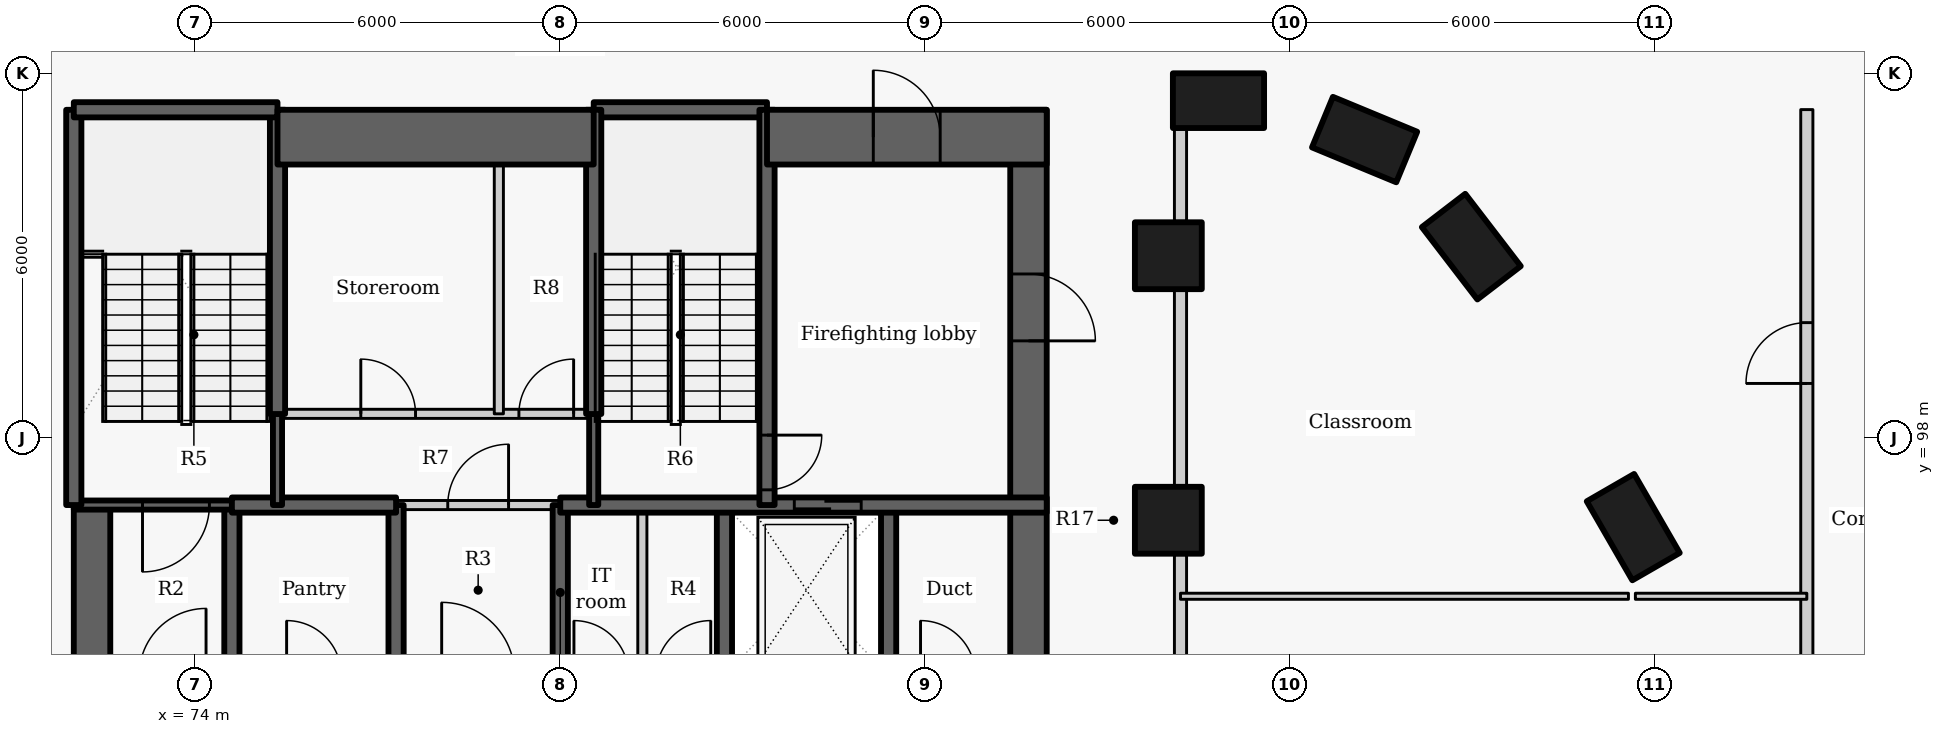
"""IFC4 building model, lengths in metres.
Left out: names, types, materials, properties, quantities, classifications, styles, units other than length and angle.
Written with IfcOpenShell. Run it as: python <this file> out.ifc"""

import sys

from ifc_helpers import new_model, si_unit, direction, frame, frame_2d, origin, origin_2d, place, context, subcontext, project, spatial, rectangle, extrude, element, fill, save


model = new_model("IFC4")
c1 = context("Model", 3, precision=1e-05, world=origin(), true_north=direction((0.0, 1.0)))
c2 = subcontext(c1, "Body", "Model", "MODEL_VIEW")
j1 = project(units=[si_unit("LENGTHUNIT", "METRE"), si_unit("PLANEANGLEUNIT", "RADIAN")], contexts=[c1])
p1 = place(None, origin())
s1 = spatial("IfcSite", under=j1, at=p1, CompositionType="ELEMENT")
p2 = place(p1, origin())
s2 = spatial("IfcBuilding", under=s1, at=p2, CompositionType="ELEMENT")
p3 = place(p2, frame((0.0, 0.0, 19.8)))
s3 = spatial("IfcBuildingStorey", under=s2, at=p3, CompositionType="ELEMENT", Elevation=19.8)
for number, where, z_axis, x_axis in (
    (1, (97.646, 96.537, 0.0), (0.0, 0.0, 1.0), (-0.5, 0.866, 0.0)),
    (2, (94.982, 101.149, 0.0), (0.0, 0.0, 1.0), (-0.609, 0.793, 0.0)),
    (3, (93.227, 102.91, 0.0), (0.0, 0.0, 1.0), (-0.924, 0.383, 0.0)),
    (4, (90.825, 103.55, 0.0), (0.0, 0.0, 1.0), (-1.0, 0.0, 0.0)),
):
    element("IfcColumn", number, at=place(p3, frame(where, z_axis=z_axis, x_axis=x_axis)), inside=s3, PredefinedType="COLUMN", context=c2, shape_type="SweptSolid", body=[
        extrude(rectangle(XDim=1.5, YDim=0.9, at=origin_2d()), origin(), (0.0, 0.0, 1.0), 4.2),
    ])
for number, where, z_axis, x_axis in (
    (5, (90.0, 96.65, 0.0), (0.0, 0.0, 1.0), (0.0, 1.0, 0.0)),
    (6, (90.0, 101.0, 0.0), (0.0, 0.0, 1.0), (0.0, 1.0, 0.0)),
):
    element("IfcColumn", number, at=place(p3, frame(where, z_axis=z_axis, x_axis=x_axis)), inside=s3, PredefinedType="COLUMN", context=c2, shape_type="SweptSolid", body=[
        extrude(rectangle(XDim=1.1, YDim=1.1, at=origin_2d()), origin(), (0.0, 0.0, 1.0), 4.2),
    ])
p4 = place(p3, frame((74.6, 94.1, -0.3), z_axis=(0.0, 0.0, 1.0), x_axis=(0.0, 1.0, 0.0)))
e7 = element("IfcWall", 7, at=p4, inside=s3, PredefinedType="SHEAR", context=c2, shape_type="SweptSolid", body=[
    extrude(rectangle(XDim=2.8, YDim=0.25, at=frame_2d((1.4, 0.0))), origin(), (0.0, 0.0, 1.0), 4.2),
])
p5 = place(p3, frame((72.3, 87.8, -0.3), z_axis=(0.0, 0.0, 1.0), x_axis=(0.0, 1.0, 0.0)))
e8 = element("IfcWall", 8, at=p5, inside=s3, PredefinedType="SHEAR", context=c2, shape_type="SweptSolid", body=[
    extrude(rectangle(XDim=9.1, YDim=0.6, at=frame_2d((4.55, 0.0))), origin(), (0.0, 0.0, 1.0), 4.2),
])
for number, where, z_axis, x_axis in (
    (9, (77.3, 94.1, -0.3), (0.0, 0.0, 1.0), (0.0, 1.0, 0.0)),
    (10, (80.0, 94.1, -0.3), (0.0, 0.0, 1.0), (0.0, 1.0, 0.0)),
    (11, (82.7, 94.1, -0.3), (0.0, 0.0, 1.0), (0.0, 1.0, 0.0)),
    (12, (85.4, 94.1, -0.3), (0.0, 0.0, 1.0), (0.0, 1.0, 0.0)),
):
    element("IfcWall", number, at=place(p3, frame(where, z_axis=z_axis, x_axis=x_axis)), inside=s3, PredefinedType="SHEAR", context=c2, shape_type="SweptSolid", body=[
        extrude(rectangle(XDim=2.8, YDim=0.25, at=frame_2d((1.4, 0.0))), origin(), (0.0, 0.0, 1.0), 4.2),
    ])
p6 = place(p3, frame((87.7, 103.4, -0.3), z_axis=(0.0, 0.0, 1.0), x_axis=(0.0, -1.0, 0.0)))
e13 = element("IfcWall", 13, at=p6, inside=s3, PredefinedType="SHEAR", context=c2, shape_type="SweptSolid", body=[
    extrude(rectangle(XDim=15.6, YDim=0.6, at=frame_2d((7.8, 0.0))), origin(), (0.0, 0.0, 1.0), 4.2),
])
p7 = place(p6, frame((2.7, 0.0, 0.3)))
e14 = element("IfcOpeningElement", 14, at=p7, cuts=e13, PredefinedType="OPENING", context=c2, shape_type="SweptSolid", body=[
    extrude(rectangle(XDim=1.1, YDim=2.1, at=frame_2d((0.55, 1.05))), frame((0.0, 0.31, 0.0), z_axis=(0.0, -1.0, 0.0), x_axis=(1.0, 0.0, 0.0)), (0.0, 0.0, 1.0), 0.62),
])
p8 = place(p3, frame((74.6, 96.9, -0.3), z_axis=(0.0, 0.0, 1.0), x_axis=(-1.0, 0.0, 0.0)))
e15 = element("IfcWall", 15, at=p8, inside=s3, PredefinedType="SHEAR", context=c2, shape_type="SweptSolid", body=[
    extrude(rectangle(XDim=2.6, YDim=0.15, at=frame_2d((1.3, 0.0))), origin(), (0.0, 0.0, 1.0), 4.2),
])
p9 = place(p8, frame((0.37, 0.0, 0.3)))
e16 = element("IfcOpeningElement", 16, at=p9, cuts=e15, PredefinedType="OPENING", context=c2, shape_type="SweptSolid", body=[
    extrude(rectangle(XDim=1.1, YDim=2.1, at=frame_2d((0.55, 1.05))), frame((0.0, 0.085, 0.0), z_axis=(0.0, -1.0, 0.0), x_axis=(1.0, 0.0, 0.0)), (0.0, 0.0, 1.0), 0.17),
])
p10 = place(p3, frame((74.6, 96.9, -0.3), z_axis=(0.0, 0.0, 1.0), x_axis=(1.0, 0.0, 0.0)))
e17 = element("IfcWall", 17, at=p10, inside=s3, PredefinedType="SHEAR", context=c2, shape_type="SweptSolid", body=[
    extrude(rectangle(XDim=2.7, YDim=0.25, at=frame_2d((1.35, 0.0))), origin(), (0.0, 0.0, 1.0), 4.2),
])
p11 = place(p3, frame((80.0, 96.9, -0.3), z_axis=(0.0, 0.0, 1.0), x_axis=(1.0, 0.0, 0.0)))
e18 = element("IfcWall", 18, at=p11, inside=s3, PredefinedType="SHEAR", context=c2, shape_type="SweptSolid", body=[
    extrude(rectangle(XDim=8.0, YDim=0.25, at=frame_2d((4.0, 0.0))), origin(), (0.0, 0.0, 1.0), 4.2),
])
p12 = place(p11, frame((3.849, 0.0, 0.3)))
e19 = element("IfcOpeningElement", 19, at=p12, cuts=e18, PredefinedType="OPENING", context=c2, shape_type="SweptSolid", body=[
    extrude(rectangle(XDim=1.1, YDim=2.1, at=frame_2d((0.55, 1.05))), frame((0.0, 0.135, 0.0), z_axis=(0.0, -1.0, 0.0), x_axis=(1.0, 0.0, 0.0)), (0.0, 0.0, 1.0), 0.27),
])
p13 = place(p3, frame((77.3, 96.9, 0.0), z_axis=(0.0, 0.0, 1.0), x_axis=(1.0, 0.0, 0.0)))
e20 = element("IfcWall", 20, at=p13, inside=s3, PredefinedType="PARTITIONING", context=c2, shape_type="SweptSolid", body=[
    extrude(rectangle(XDim=2.7, YDim=0.15, at=frame_2d((1.35, 0.0))), origin(), (0.0, 0.0, 1.0), 3.9),
])
p14 = place(p13, frame((0.85, 0.0, 0.0)))
e21 = element("IfcOpeningElement", 21, at=p14, cuts=e20, PredefinedType="OPENING", context=c2, shape_type="SweptSolid", body=[
    extrude(rectangle(XDim=1.0, YDim=2.1, at=frame_2d((0.5, 1.05))), frame((0.0, 0.085, 0.0), z_axis=(0.0, -1.0, 0.0), x_axis=(1.0, 0.0, 0.0)), (0.0, 0.0, 1.0), 0.17),
])
p15 = place(p3, frame((81.35, 94.1, 0.0), z_axis=(0.0, 0.0, 1.0), x_axis=(0.0, 1.0, 0.0)))
e22 = element("IfcWall", 22, at=p15, inside=s3, PredefinedType="PARTITIONING", context=c2, shape_type="SweptSolid", body=[
    extrude(rectangle(XDim=2.8, YDim=0.15, at=frame_2d((1.4, 0.0))), origin(), (0.0, 0.0, 1.0), 3.9),
])
p16 = place(p3, frame((75.35, 96.9, -0.3), z_axis=(0.0, 0.0, 1.0), x_axis=(0.0, 1.0, 0.0)))
e23 = element("IfcWall", 23, at=p16, inside=s3, PredefinedType="SHEAR", context=c2, shape_type="SweptSolid", body=[
    extrude(rectangle(XDim=1.503, YDim=0.15, at=frame_2d((0.751, 0.0))), origin(), (0.0, 0.0, 1.0), 4.2),
])
p17 = place(p3, frame((75.35, 98.397, -0.3), z_axis=(0.0, 0.0, 1.0), x_axis=(0.0, 1.0, 0.0)))
e24 = element("IfcWall", 24, at=p17, inside=s3, PredefinedType="SHEAR", context=c2, shape_type="SweptSolid", body=[
    extrude(rectangle(XDim=5.003, YDim=0.25, at=frame_2d((2.501, 0.0))), origin(), (0.0, 0.0, 1.0), 4.2),
])
p18 = place(p3, frame((72.0, 96.9, -0.3), z_axis=(0.0, 0.0, 1.0), x_axis=(0.0, 1.0, 0.0)))
e25 = element("IfcWall", 25, at=p18, inside=s3, PredefinedType="SHEAR", context=c2, shape_type="SweptSolid", body=[
    extrude(rectangle(XDim=6.5, YDim=0.25, at=frame_2d((3.25, 0.0))), origin(), (0.0, 0.0, 1.0), 4.2),
])
p19 = place(p3, frame((72.0, 103.4, -0.3), z_axis=(0.0, 0.0, 1.0), x_axis=(1.0, 0.0, 0.0)))
e26 = element("IfcWall", 26, at=p19, inside=s3, PredefinedType="SHEAR", context=c2, shape_type="SweptSolid", body=[
    extrude(rectangle(XDim=3.35, YDim=0.25, at=frame_2d((1.675, 0.0))), origin(), (0.0, 0.0, 1.0), 4.2),
])
p20 = place(p3, frame((80.55, 103.4, -0.3), z_axis=(0.0, 0.0, 1.0), x_axis=(1.0, 0.0, 0.0)))
e27 = element("IfcWall", 27, at=p20, inside=s3, PredefinedType="SHEAR", context=c2, shape_type="SweptSolid", body=[
    extrude(rectangle(XDim=2.85, YDim=0.25, at=frame_2d((1.425, 0.0))), origin(), (0.0, 0.0, 1.0), 4.2),
])
p21 = place(p3, frame((83.4, 103.4, -0.3), z_axis=(0.0, 0.0, 1.0), x_axis=(0.0, -1.0, 0.0)))
e28 = element("IfcWall", 28, at=p21, inside=s3, PredefinedType="SHEAR", context=c2, shape_type="SweptSolid", body=[
    extrude(rectangle(XDim=6.5, YDim=0.25, at=frame_2d((3.25, 0.0))), origin(), (0.0, 0.0, 1.0), 4.2),
])
p22 = place(p21, frame((5.35, 0.0, 0.3)))
e29 = element("IfcOpeningElement", 29, at=p22, cuts=e28, PredefinedType="OPENING", context=c2, shape_type="SweptSolid", body=[
    extrude(rectangle(XDim=0.9, YDim=2.1, at=frame_2d((0.45, 1.05))), frame((0.0, 0.135, 0.0), z_axis=(0.0, -1.0, 0.0), x_axis=(1.0, 0.0, 0.0)), (0.0, 0.0, 1.0), 0.27),
])
p23 = place(p3, frame((80.55, 96.9, -0.3), z_axis=(0.0, 0.0, 1.0), x_axis=(0.0, 1.0, 0.0)))
e30 = element("IfcWall", 30, at=p23, inside=s3, PredefinedType="SHEAR", context=c2, shape_type="SweptSolid", body=[
    extrude(rectangle(XDim=1.503, YDim=0.15, at=frame_2d((0.751, 0.0))), origin(), (0.0, 0.0, 1.0), 4.2),
])
p24 = place(p3, frame((80.55, 98.397, -0.3), z_axis=(0.0, 0.0, 1.0), x_axis=(0.0, 1.0, 0.0)))
e31 = element("IfcWall", 31, at=p24, inside=s3, PredefinedType="SHEAR", context=c2, shape_type="SweptSolid", body=[
    extrude(rectangle(XDim=5.003, YDim=0.25, at=frame_2d((2.501, 0.0))), origin(), (0.0, 0.0, 1.0), 4.2),
])
p25 = place(p3, frame((75.35, 102.95, -0.3), z_axis=(0.0, 0.0, 1.0), x_axis=(1.0, 0.0, 0.0)))
e32 = element("IfcWall", 32, at=p25, inside=s3, PredefinedType="SHEAR", context=c2, shape_type="SweptSolid", body=[
    extrude(rectangle(XDim=5.2, YDim=0.9, at=frame_2d((2.6, 0.0))), origin(), (0.0, 0.0, 1.0), 4.2),
])
p26 = place(p3, frame((83.4, 102.95, -0.3), z_axis=(0.0, 0.0, 1.0), x_axis=(1.0, 0.0, 0.0)))
e33 = element("IfcWall", 33, at=p26, inside=s3, PredefinedType="SHEAR", context=c2, shape_type="SweptSolid", body=[
    extrude(rectangle(XDim=4.6, YDim=0.9, at=frame_2d((2.3, 0.0))), origin(), (0.0, 0.0, 1.0), 4.2),
])
p27 = place(p26, frame((1.748, 0.0, 0.3)))
e34 = element("IfcOpeningElement", 34, at=p27, cuts=e33, PredefinedType="OPENING", context=c2, shape_type="SweptSolid", body=[
    extrude(rectangle(XDim=1.1, YDim=2.1, at=frame_2d((0.55, 1.05))), frame((0.0, 0.46, 0.0), z_axis=(0.0, -1.0, 0.0), x_axis=(1.0, 0.0, 0.0)), (0.0, 0.0, 1.0), 0.92),
])
p28 = place(p3, frame((75.35, 98.4, 0.0), z_axis=(0.0, 0.0, 1.0), x_axis=(1.0, 0.0, 0.0)))
e35 = element("IfcWall", 35, at=p28, inside=s3, PredefinedType="PARTITIONING", context=c2, shape_type="SweptSolid", body=[
    extrude(rectangle(XDim=5.2, YDim=0.15, at=frame_2d((2.6, 0.0))), origin(), (0.0, 0.0, 1.0), 3.9),
])
p29 = place(p28, frame((1.37, 0.0, 0.0)))
e36 = element("IfcOpeningElement", 36, at=p29, cuts=e35, PredefinedType="OPENING", context=c2, shape_type="SweptSolid", body=[
    extrude(rectangle(XDim=0.9, YDim=2.1, at=frame_2d((0.45, 1.05))), frame((0.0, 0.085, 0.0), z_axis=(0.0, -1.0, 0.0), x_axis=(1.0, 0.0, 0.0)), (0.0, 0.0, 1.0), 0.17),
])
p30 = place(p28, frame((3.97, 0.0, 0.0)))
e37 = element("IfcOpeningElement", 37, at=p30, cuts=e35, PredefinedType="OPENING", context=c2, shape_type="SweptSolid", body=[
    extrude(rectangle(XDim=0.9, YDim=2.1, at=frame_2d((0.45, 1.05))), frame((0.0, 0.085, 0.0), z_axis=(0.0, -1.0, 0.0), x_axis=(1.0, 0.0, 0.0)), (0.0, 0.0, 1.0), 0.17),
])
p31 = place(p3, frame((78.99, 98.4, 0.0), z_axis=(0.0, 0.0, 1.0), x_axis=(0.0, 1.0, 0.0)))
e38 = element("IfcWall", 38, at=p31, inside=s3, PredefinedType="PARTITIONING", context=c2, shape_type="SweptSolid", body=[
    extrude(rectangle(XDim=5.0, YDim=0.15, at=frame_2d((2.5, 0.0))), origin(), (0.0, 0.0, 1.0), 3.9),
])
p32 = place(p3, frame((100.5, 92.53, 0.0), z_axis=(0.0, 0.0, 1.0), x_axis=(0.0, 1.0, 0.0)))
e39 = element("IfcWall", 39, at=p32, inside=s3, PredefinedType="PARTITIONING", context=c2, shape_type="SweptSolid", body=[
    extrude(rectangle(XDim=10.873, YDim=0.2, at=frame_2d((5.437, 0.0))), origin(), (0.0, 0.0, 1.0), 3.9),
])
p33 = place(p32, frame((6.37, 0.0, 0.0)))
e40 = element("IfcOpeningElement", 40, at=p33, cuts=e39, PredefinedType="OPENING", context=c2, shape_type="SweptSolid", body=[
    extrude(rectangle(XDim=1.0, YDim=2.1, at=frame_2d((0.5, 1.05))), frame((0.0, 0.11, 0.0), z_axis=(0.0, -1.0, 0.0), x_axis=(1.0, 0.0, 0.0)), (0.0, 0.0, 1.0), 0.22),
])
for number, where, z_axis, x_axis in (
    (41, (90.2, 92.867, 0.0), (0.0, 0.0, 1.0), (0.0, 1.0, 0.0)),
    (42, (90.2, 97.217, 0.0), (0.0, 0.0, 1.0), (0.0, 1.0, 0.0)),
):
    element("IfcWall", number, at=place(p3, frame(where, z_axis=z_axis, x_axis=x_axis)), inside=s3, PredefinedType="PARTITIONING", context=c2, shape_type="SweptSolid", body=[
        extrude(rectangle(XDim=3.216, YDim=0.2, at=frame_2d((1.608, 0.0))), origin(), (0.0, 0.0, 1.0), 3.13),
    ])
p34 = place(p3, frame((90.2, 101.567, 0.0), z_axis=(0.0, 0.0, 1.0), x_axis=(0.0, 1.0, 0.0)))
e43 = element("IfcWall", 43, at=p34, inside=s3, PredefinedType="PARTITIONING", context=c2, shape_type="SweptSolid", body=[
    extrude(rectangle(XDim=1.516, YDim=0.2, at=frame_2d((0.758, 0.0))), origin(), (0.0, 0.0, 1.0), 3.9),
])
p35 = place(p3, frame((90.2, 95.4, 0.0), z_axis=(0.0, 0.0, 1.0), x_axis=(1.0, 0.0, 0.0)))
e44 = element("IfcWall", 44, at=p35, inside=s3, PredefinedType="PARTITIONING", context=c2, shape_type="SweptSolid", body=[
    extrude(rectangle(XDim=7.366, YDim=0.1, at=frame_2d((3.683, 0.0))), origin(), (0.0, 0.0, 1.0), 3.9),
])
p36 = place(p3, frame((97.68, 95.4, 0.0), z_axis=(0.0, 0.0, 1.0), x_axis=(1.0, 0.0, 0.0)))
e45 = element("IfcWall", 45, at=p36, inside=s3, PredefinedType="PARTITIONING", context=c2, shape_type="SweptSolid", body=[
    extrude(rectangle(XDim=2.82, YDim=0.1, at=frame_2d((1.41, 0.0))), origin(), (0.0, 0.0, 1.0), 2.98),
])
p37 = place(p12, origin())
e46 = element("IfcDoor", 46, at=p37, inside=s3, OperationType="SLIDING_TO_LEFT", PredefinedType="DOOR", context=c2, shape_type="SweptSolid", body=[
    extrude(rectangle(XDim=1.1, YDim=2.1, at=frame_2d((0.55, 1.05))), frame((0.0, 0.025, 0.0), z_axis=(0.0, -1.0, 0.0), x_axis=(1.0, 0.0, 0.0)), (0.0, 0.0, 1.0), 0.05),
])
fill(e19, e46)
p38 = place(p14, origin())
e47 = element("IfcDoor", 47, at=p38, inside=s3, OperationType="SINGLE_SWING_RIGHT", PredefinedType="DOOR", context=c2, shape_type="SweptSolid", body=[
    extrude(rectangle(XDim=1.0, YDim=2.1, at=frame_2d((0.5, 1.05))), frame((0.0, 0.025, 0.0), z_axis=(0.0, -1.0, 0.0), x_axis=(1.0, 0.0, 0.0)), (0.0, 0.0, 1.0), 0.05),
])
fill(e21, e47)
p39 = place(p29, origin())
e48 = element("IfcDoor", 48, at=p39, inside=s3, OperationType="SINGLE_SWING_LEFT", PredefinedType="DOOR", context=c2, shape_type="SweptSolid", body=[
    extrude(rectangle(XDim=0.9, YDim=2.1, at=frame_2d((0.45, 1.05))), frame((0.0, 0.025, 0.0), z_axis=(0.0, -1.0, 0.0), x_axis=(1.0, 0.0, 0.0)), (0.0, 0.0, 1.0), 0.05),
])
fill(e36, e48)
p40 = place(p30, origin())
e49 = element("IfcDoor", 49, at=p40, inside=s3, OperationType="SINGLE_SWING_RIGHT", PredefinedType="DOOR", context=c2, shape_type="SweptSolid", body=[
    extrude(rectangle(XDim=0.9, YDim=2.1, at=frame_2d((0.45, 1.05))), frame((0.0, 0.025, 0.0), z_axis=(0.0, -1.0, 0.0), x_axis=(1.0, 0.0, 0.0)), (0.0, 0.0, 1.0), 0.05),
])
fill(e37, e49)
p41 = place(p9, origin())
e50 = element("IfcDoor", 50, at=p41, inside=s3, OperationType="SINGLE_SWING_RIGHT", PredefinedType="DOOR", context=c2, shape_type="SweptSolid", body=[
    extrude(rectangle(XDim=1.1, YDim=2.1, at=frame_2d((0.55, 1.05))), frame((0.0, 0.025, 0.0), z_axis=(0.0, -1.0, 0.0), x_axis=(1.0, 0.0, 0.0)), (0.0, 0.0, 1.0), 0.05),
])
fill(e16, e50)
p42 = place(p22, origin())
e51 = element("IfcDoor", 51, at=p42, inside=s3, OperationType="SINGLE_SWING_LEFT", PredefinedType="DOOR", context=c2, shape_type="SweptSolid", body=[
    extrude(rectangle(XDim=0.9, YDim=2.1, at=frame_2d((0.45, 1.05))), frame((0.0, 0.025, 0.0), z_axis=(0.0, -1.0, 0.0), x_axis=(1.0, 0.0, 0.0)), (0.0, 0.0, 1.0), 0.05),
])
fill(e29, e51)
p43 = place(p33, origin())
e52 = element("IfcDoor", 52, at=p43, inside=s3, OperationType="SINGLE_SWING_LEFT", PredefinedType="DOOR", context=c2, shape_type="SweptSolid", body=[
    extrude(rectangle(XDim=1.0, YDim=2.1, at=frame_2d((0.5, 1.05))), frame((0.0, 0.025, 0.0), z_axis=(0.0, -1.0, 0.0), x_axis=(1.0, 0.0, 0.0)), (0.0, 0.0, 1.0), 0.05),
])
fill(e40, e52)
p44 = place(p7, origin())
e53 = element("IfcDoor", 53, at=p44, inside=s3, OperationType="SINGLE_SWING_RIGHT", PredefinedType="DOOR", context=c2, shape_type="SweptSolid", body=[
    extrude(rectangle(XDim=1.1, YDim=2.1, at=frame_2d((0.55, 1.05))), frame((0.0, 0.025, 0.0), z_axis=(0.0, -1.0, 0.0), x_axis=(1.0, 0.0, 0.0)), (0.0, 0.0, 1.0), 0.05),
])
fill(e14, e53)
p45 = place(p27, origin())
e54 = element("IfcDoor", 54, at=p45, inside=s3, OperationType="SINGLE_SWING_LEFT", PredefinedType="DOOR", context=c2, shape_type="SweptSolid", body=[
    extrude(rectangle(XDim=1.1, YDim=2.1, at=frame_2d((0.55, 1.05))), frame((0.0, 0.025, 0.0), z_axis=(0.0, -1.0, 0.0), x_axis=(1.0, 0.0, 0.0)), (0.0, 0.0, 1.0), 0.05),
])
fill(e34, e54)
save(model, sys.argv[1])
